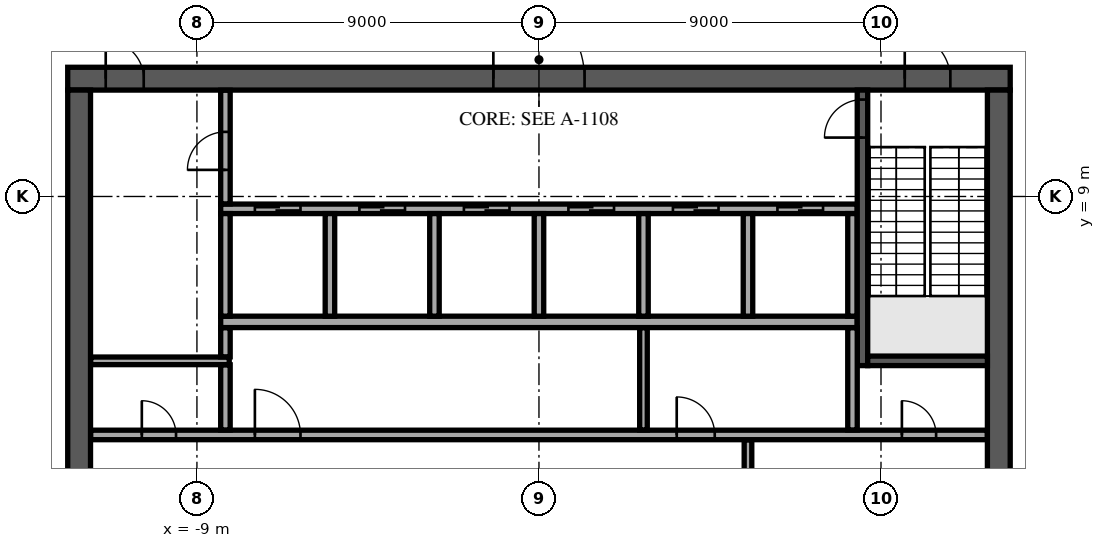
"""IFC4 building model, lengths in metres.
Left out: names, types, materials, properties, quantities, classifications, styles, units other than length and angle.
Written with IfcOpenShell. Run it as: python <this file> out.ifc"""

import sys

from ifc_helpers import new_model, si_unit, direction, frame, frame_2d, origin, place, context, subcontext, project, spatial, rectangle, extrude, element, fill, save


model = new_model("IFC4")
c1 = context("Model", 3, precision=1e-05, world=origin(), true_north=direction((0.0, 1.0)))
c2 = subcontext(c1, "Body", "Model", "MODEL_VIEW")
j1 = project(units=[si_unit("LENGTHUNIT", "METRE"), si_unit("PLANEANGLEUNIT", "RADIAN")], contexts=[c1])
p1 = place(None, origin())
s1 = spatial("IfcSite", under=j1, at=p1, CompositionType="ELEMENT")
p2 = place(p1, origin())
s2 = spatial("IfcBuilding", under=s1, at=p2, CompositionType="ELEMENT")
p3 = place(p2, frame((0.0, 0.0, 344.5)))
s3 = spatial("IfcBuildingStorey", under=s2, at=p3, CompositionType="ELEMENT", Elevation=344.5)
p4 = place(p3, frame((-12.4, 12.1, 0.0), z_axis=(0.0, 0.0, 1.0), x_axis=(1.0, 0.0, 0.0)))
e1 = element("IfcWall", 1, at=p4, inside=s3, PredefinedType="SHEAR", context=c2, shape_type="SweptSolid", body=[
    extrude(rectangle(XDim=24.8, YDim=0.6, at=frame_2d((12.4, 0.0))), origin(), (0.0, 0.0, 1.0), 5.3),
])
p5 = place(p4, frame((11.2, 0.0, 0.0)))
e2 = element("IfcOpeningElement", 2, at=p5, cuts=e1, PredefinedType="OPENING", context=c2, shape_type="SweptSolid", body=[
    extrude(rectangle(XDim=2.4, YDim=2.4, at=frame_2d((1.2, 1.2))), frame((0.0, 0.31, 0.0), z_axis=(0.0, -1.0, 0.0), x_axis=(1.0, 0.0, 0.0)), (0.0, 0.0, 1.0), 0.62),
])
p6 = place(p4, frame((22.025, 0.0, 0.0)))
e3 = element("IfcOpeningElement", 3, at=p6, cuts=e1, PredefinedType="OPENING", context=c2, shape_type="SweptSolid", body=[
    extrude(rectangle(XDim=1.2, YDim=2.1, at=frame_2d((0.6, 1.05))), frame((0.0, 0.31, 0.0), z_axis=(0.0, -1.0, 0.0), x_axis=(1.0, 0.0, 0.0)), (0.0, 0.0, 1.0), 0.62),
])
p7 = place(p4, frame((1.0, 0.0, 0.0)))
e4 = element("IfcOpeningElement", 4, at=p7, cuts=e1, PredefinedType="OPENING", context=c2, shape_type="SweptSolid", body=[
    extrude(rectangle(XDim=1.0, YDim=2.1, at=frame_2d((0.5, 1.05))), frame((0.0, 0.31, 0.0), z_axis=(0.0, -1.0, 0.0), x_axis=(1.0, 0.0, 0.0)), (0.0, 0.0, 1.0), 0.62),
])
p8 = place(p3, frame((12.1, -11.8, 0.0), z_axis=(0.0, 0.0, 1.0), x_axis=(0.0, 1.0, 0.0)))
e5 = element("IfcWall", 5, at=p8, inside=s3, PredefinedType="SHEAR", context=c2, shape_type="SweptSolid", body=[
    extrude(rectangle(XDim=23.6, YDim=0.6, at=frame_2d((11.8, 0.0))), origin(), (0.0, 0.0, 1.0), 5.3),
])
p9 = place(p8, frame((10.6, 0.0, 0.0)))
e6 = element("IfcOpeningElement", 6, at=p9, cuts=e5, PredefinedType="OPENING", context=c2, shape_type="SweptSolid", body=[
    extrude(rectangle(XDim=2.4, YDim=2.4, at=frame_2d((1.2, 1.2))), frame((0.0, 0.31, 0.0), z_axis=(0.0, -1.0, 0.0), x_axis=(1.0, 0.0, 0.0)), (0.0, 0.0, 1.0), 0.62),
])
p10 = place(p3, frame((-12.1, -11.8, 0.0), z_axis=(0.0, 0.0, 1.0), x_axis=(0.0, 1.0, 0.0)))
e7 = element("IfcWall", 7, at=p10, inside=s3, PredefinedType="SHEAR", context=c2, shape_type="SweptSolid", body=[
    extrude(rectangle(XDim=23.6, YDim=0.6, at=frame_2d((11.8, 0.0))), origin(), (0.0, 0.0, 1.0), 5.3),
])
p11 = place(p10, frame((10.6, 0.0, 0.0)))
e8 = element("IfcOpeningElement", 8, at=p11, cuts=e7, PredefinedType="OPENING", context=c2, shape_type="SweptSolid", body=[
    extrude(rectangle(XDim=2.4, YDim=2.4, at=frame_2d((1.2, 1.2))), frame((0.0, 0.31, 0.0), z_axis=(0.0, -1.0, 0.0), x_axis=(1.0, 0.0, 0.0)), (0.0, 0.0, 1.0), 0.62),
])
p12 = place(p3, frame((-8.375, 5.7, 0.0), z_axis=(0.0, 0.0, 1.0), x_axis=(1.0, 0.0, 0.0)))
e9 = element("IfcWall", 9, at=p12, inside=s3, PredefinedType="SOLIDWALL", context=c2, shape_type="SweptSolid", body=[
    extrude(rectangle(XDim=16.75, YDim=0.3, at=frame_2d((8.375, 0.0))), origin(), (0.0, 0.0, 1.0), 5.3),
])
p13 = place(p3, frame((-8.375, 8.675, 0.0), z_axis=(0.0, 0.0, 1.0), x_axis=(1.0, 0.0, 0.0)))
e10 = element("IfcWall", 10, at=p13, inside=s3, PredefinedType="SOLIDWALL", context=c2, shape_type="SweptSolid", body=[
    extrude(rectangle(XDim=16.75, YDim=0.25, at=frame_2d((8.375, 0.0))), origin(), (0.0, 0.0, 1.0), 5.3),
])
p14 = place(p13, frame((0.9, 0.0, 0.0)))
e11 = element("IfcOpeningElement", 11, at=p14, cuts=e10, PredefinedType="OPENING", context=c2, shape_type="SweptSolid", body=[
    extrude(rectangle(XDim=1.2, YDim=2.1, at=frame_2d((0.6, 1.05))), frame((0.0, 0.135, 0.0), z_axis=(0.0, -1.0, 0.0), x_axis=(1.0, 0.0, 0.0)), (0.0, 0.0, 1.0), 0.27),
])
p15 = place(p13, frame((3.65, 0.0, 0.0)))
e12 = element("IfcOpeningElement", 12, at=p15, cuts=e10, PredefinedType="OPENING", context=c2, shape_type="SweptSolid", body=[
    extrude(rectangle(XDim=1.2, YDim=2.1, at=frame_2d((0.6, 1.05))), frame((0.0, 0.135, 0.0), z_axis=(0.0, -1.0, 0.0), x_axis=(1.0, 0.0, 0.0)), (0.0, 0.0, 1.0), 0.27),
])
p16 = place(p13, frame((6.4, 0.0, 0.0)))
e13 = element("IfcOpeningElement", 13, at=p16, cuts=e10, PredefinedType="OPENING", context=c2, shape_type="SweptSolid", body=[
    extrude(rectangle(XDim=1.2, YDim=2.1, at=frame_2d((0.6, 1.05))), frame((0.0, 0.135, 0.0), z_axis=(0.0, -1.0, 0.0), x_axis=(1.0, 0.0, 0.0)), (0.0, 0.0, 1.0), 0.27),
])
p17 = place(p13, frame((9.15, 0.0, 0.0)))
e14 = element("IfcOpeningElement", 14, at=p17, cuts=e10, PredefinedType="OPENING", context=c2, shape_type="SweptSolid", body=[
    extrude(rectangle(XDim=1.2, YDim=2.1, at=frame_2d((0.6, 1.05))), frame((0.0, 0.135, 0.0), z_axis=(0.0, -1.0, 0.0), x_axis=(1.0, 0.0, 0.0)), (0.0, 0.0, 1.0), 0.27),
])
p18 = place(p13, frame((11.9, 0.0, 0.0)))
e15 = element("IfcOpeningElement", 15, at=p18, cuts=e10, PredefinedType="OPENING", context=c2, shape_type="SweptSolid", body=[
    extrude(rectangle(XDim=1.2, YDim=2.1, at=frame_2d((0.6, 1.05))), frame((0.0, 0.135, 0.0), z_axis=(0.0, -1.0, 0.0), x_axis=(1.0, 0.0, 0.0)), (0.0, 0.0, 1.0), 0.27),
])
p19 = place(p13, frame((14.65, 0.0, 0.0)))
e16 = element("IfcOpeningElement", 16, at=p19, cuts=e10, PredefinedType="OPENING", context=c2, shape_type="SweptSolid", body=[
    extrude(rectangle(XDim=1.2, YDim=2.1, at=frame_2d((0.6, 1.05))), frame((0.0, 0.135, 0.0), z_axis=(0.0, -1.0, 0.0), x_axis=(1.0, 0.0, 0.0)), (0.0, 0.0, 1.0), 0.27),
])
for number, where, z_axis, x_axis in (
    (17, (-8.25, 5.85, 0.0), (0.0, 0.0, 1.0), (0.0, 1.0, 0.0)),
    (18, (-5.5, 5.85, 0.0), (0.0, 0.0, 1.0), (0.0, 1.0, 0.0)),
    (19, (-2.75, 5.85, 0.0), (0.0, 0.0, 1.0), (0.0, 1.0, 0.0)),
    (20, (0.0, 5.85, 0.0), (0.0, 0.0, 1.0), (0.0, 1.0, 0.0)),
    (21, (2.75, 5.85, 0.0), (0.0, 0.0, 1.0), (0.0, 1.0, 0.0)),
    (22, (5.5, 5.85, 0.0), (0.0, 0.0, 1.0), (0.0, 1.0, 0.0)),
    (23, (8.25, 5.85, 0.0), (0.0, 0.0, 1.0), (0.0, 1.0, 0.0)),
):
    element("IfcWall", number, at=place(p3, frame(where, z_axis=z_axis, x_axis=x_axis)), inside=s3, PredefinedType="SOLIDWALL", context=c2, shape_type="SweptSolid", body=[
        extrude(rectangle(XDim=2.7, YDim=0.25, at=frame_2d((1.35, 0.0))), origin(), (0.0, 0.0, 1.0), 5.3),
    ])
p20 = place(p3, frame((8.512, 4.55, 0.0), z_axis=(0.0, 0.0, 1.0), x_axis=(0.0, 1.0, 0.0)))
e24 = element("IfcWall", 24, at=p20, inside=s3, PredefinedType="SOLIDWALL", context=c2, shape_type="SweptSolid", body=[
    extrude(rectangle(XDim=7.25, YDim=0.275, at=frame_2d((3.625, 0.0))), origin(), (0.0, 0.0, 1.0), 5.3),
])
p21 = place(p20, frame((6.0, 0.0, 0.0)))
e25 = element("IfcOpeningElement", 25, at=p21, cuts=e24, PredefinedType="OPENING", context=c2, shape_type="SweptSolid", body=[
    extrude(rectangle(XDim=1.0, YDim=2.1, at=frame_2d((0.5, 1.05))), frame((0.0, 0.147, 0.0), z_axis=(0.0, -1.0, 0.0), x_axis=(1.0, 0.0, 0.0)), (0.0, 0.0, 1.0), 0.295),
])
p22 = place(p3, frame((8.65, 4.675, 0.0), z_axis=(0.0, 0.0, 1.0), x_axis=(1.0, 0.0, 0.0)))
e26 = element("IfcWall", 26, at=p22, inside=s3, PredefinedType="SOLIDWALL", context=c2, shape_type="SweptSolid", body=[
    extrude(rectangle(XDim=3.15, YDim=0.25, at=frame_2d((1.575, 0.0))), origin(), (0.0, 0.0, 1.0), 5.3),
])
p23 = place(p3, frame((5.5, -2.595, 0.0), z_axis=(0.0, 0.0, 1.0), x_axis=(0.0, 1.0, 0.0)))
e27 = element("IfcWall", 27, at=p23, inside=s3, PredefinedType="PARTITIONING", context=c2, shape_type="SweptSolid", body=[
    extrude(rectangle(XDim=5.19, YDim=0.2, at=frame_2d((2.595, 0.0))), origin(), (0.0, 0.0, 1.0), 5.3),
])
p24 = place(p23, frame((1.395, 0.0, 0.0)))
e28 = element("IfcOpeningElement", 28, at=p24, cuts=e27, PredefinedType="OPENING", context=c2, shape_type="SweptSolid", body=[
    extrude(rectangle(XDim=2.4, YDim=2.4, at=frame_2d((1.2, 1.2))), frame((0.0, 0.11, 0.0), z_axis=(0.0, -1.0, 0.0), x_axis=(1.0, 0.0, 0.0)), (0.0, 0.0, 1.0), 0.22),
])
p25 = place(p3, frame((-11.795, 2.725, 0.0), z_axis=(0.0, 0.0, 1.0), x_axis=(1.0, 0.0, 0.0)))
e29 = element("IfcWall", 29, at=p25, inside=s3, PredefinedType="PARTITIONING", context=c2, shape_type="SweptSolid", body=[
    extrude(rectangle(XDim=23.59, YDim=0.25, at=frame_2d((11.795, 0.0))), origin(), (0.0, 0.0, 1.0), 5.3),
])
p26 = place(p25, frame((21.345, 0.0, 0.0)))
e30 = element("IfcOpeningElement", 30, at=p26, cuts=e29, PredefinedType="OPENING", context=c2, shape_type="SweptSolid", body=[
    extrude(rectangle(XDim=0.9, YDim=2.1, at=frame_2d((0.45, 1.05))), frame((0.0, 0.135, 0.0), z_axis=(0.0, -1.0, 0.0), x_axis=(1.0, 0.0, 0.0)), (0.0, 0.0, 1.0), 0.27),
])
p27 = place(p25, frame((1.345, 0.0, 0.0)))
e31 = element("IfcOpeningElement", 31, at=p27, cuts=e29, PredefinedType="OPENING", context=c2, shape_type="SweptSolid", body=[
    extrude(rectangle(XDim=0.9, YDim=2.1, at=frame_2d((0.45, 1.05))), frame((0.0, 0.135, 0.0), z_axis=(0.0, -1.0, 0.0), x_axis=(1.0, 0.0, 0.0)), (0.0, 0.0, 1.0), 0.27),
])
p28 = place(p25, frame((4.32, 0.0, 0.0)))
e32 = element("IfcOpeningElement", 32, at=p28, cuts=e29, PredefinedType="OPENING", context=c2, shape_type="SweptSolid", body=[
    extrude(rectangle(XDim=1.2, YDim=2.1, at=frame_2d((0.6, 1.05))), frame((0.0, 0.135, 0.0), z_axis=(0.0, -1.0, 0.0), x_axis=(1.0, 0.0, 0.0)), (0.0, 0.0, 1.0), 0.27),
])
p29 = place(p25, frame((15.42, 0.0, 0.0)))
e33 = element("IfcOpeningElement", 33, at=p29, cuts=e29, PredefinedType="OPENING", context=c2, shape_type="SweptSolid", body=[
    extrude(rectangle(XDim=1.0, YDim=2.1, at=frame_2d((0.5, 1.05))), frame((0.0, 0.135, 0.0), z_axis=(0.0, -1.0, 0.0), x_axis=(1.0, 0.0, 0.0)), (0.0, 0.0, 1.0), 0.27),
])
p30 = place(p3, frame((-8.25, 2.855, 0.0), z_axis=(0.0, 0.0, 1.0), x_axis=(0.0, 1.0, 0.0)))
e34 = element("IfcWall", 34, at=p30, inside=s3, PredefinedType="PARTITIONING", context=c2, shape_type="SweptSolid", body=[
    extrude(rectangle(XDim=1.715, YDim=0.25, at=frame_2d((0.857, 0.0))), origin(), (0.0, 0.0, 1.0), 5.3),
])
p31 = place(p3, frame((2.75, 2.855, 0.0), z_axis=(0.0, 0.0, 1.0), x_axis=(0.0, 1.0, 0.0)))
e35 = element("IfcWall", 35, at=p31, inside=s3, PredefinedType="PARTITIONING", context=c2, shape_type="SweptSolid", body=[
    extrude(rectangle(XDim=2.69, YDim=0.2, at=frame_2d((1.345, 0.0))), origin(), (0.0, 0.0, 1.0), 5.3),
])
p32 = place(p3, frame((8.25, 2.855, 0.0), z_axis=(0.0, 0.0, 1.0), x_axis=(0.0, 1.0, 0.0)))
e36 = element("IfcWall", 36, at=p32, inside=s3, PredefinedType="PARTITIONING", context=c2, shape_type="SweptSolid", body=[
    extrude(rectangle(XDim=2.69, YDim=0.25, at=frame_2d((1.345, 0.0))), origin(), (0.0, 0.0, 1.0), 5.3),
])
p33 = place(p3, frame((-11.795, 4.675, 0.0), z_axis=(0.0, 0.0, 1.0), x_axis=(1.0, 0.0, 0.0)))
e37 = element("IfcWall", 37, at=p33, inside=s3, PredefinedType="PARTITIONING", context=c2, shape_type="SweptSolid", body=[
    extrude(rectangle(XDim=3.645, YDim=0.2, at=frame_2d((1.823, 0.0))), origin(), (0.0, 0.0, 1.0), 5.3),
])
p34 = place(p3, frame((-8.25, 4.78, 0.0), z_axis=(0.0, 0.0, 1.0), x_axis=(0.0, 1.0, 0.0)))
e38 = element("IfcWall", 38, at=p34, inside=s3, PredefinedType="PARTITIONING", context=c2, shape_type="SweptSolid", body=[
    extrude(rectangle(XDim=0.765, YDim=0.25, at=frame_2d((0.382, 0.0))), origin(), (0.0, 0.0, 1.0), 5.3),
])
p35 = place(p3, frame((-8.25, 8.805, 0.0), z_axis=(0.0, 0.0, 1.0), x_axis=(0.0, 1.0, 0.0)))
e39 = element("IfcWall", 39, at=p35, inside=s3, PredefinedType="PARTITIONING", context=c2, shape_type="SweptSolid", body=[
    extrude(rectangle(XDim=2.99, YDim=0.25, at=frame_2d((1.495, 0.0))), origin(), (0.0, 0.0, 1.0), 5.3),
])
p36 = place(p35, frame((0.895, 0.0, 0.0)))
e40 = element("IfcOpeningElement", 40, at=p36, cuts=e39, PredefinedType="OPENING", context=c2, shape_type="SweptSolid", body=[
    extrude(rectangle(XDim=1.0, YDim=2.1, at=frame_2d((0.5, 1.05))), frame((0.0, 0.135, 0.0), z_axis=(0.0, -1.0, 0.0), x_axis=(1.0, 0.0, 0.0)), (0.0, 0.0, 1.0), 0.27),
])
p37 = place(p5, origin())
e41 = element("IfcDoor", 41, at=p37, inside=s3, OperationType="SINGLE_SWING_LEFT", PredefinedType="DOOR", context=c2, shape_type="SweptSolid", body=[
    extrude(rectangle(XDim=2.4, YDim=2.4, at=frame_2d((1.2, 1.2))), frame((0.0, 0.025, 0.0), z_axis=(0.0, -1.0, 0.0), x_axis=(1.0, 0.0, 0.0)), (0.0, 0.0, 1.0), 0.05),
])
fill(e2, e41)
p38 = place(p6, origin())
e42 = element("IfcDoor", 42, at=p38, inside=s3, OperationType="SINGLE_SWING_LEFT", PredefinedType="DOOR", context=c2, shape_type="SweptSolid", body=[
    extrude(rectangle(XDim=1.2, YDim=2.1, at=frame_2d((0.6, 1.05))), frame((0.0, 0.025, 0.0), z_axis=(0.0, -1.0, 0.0), x_axis=(1.0, 0.0, 0.0)), (0.0, 0.0, 1.0), 0.05),
])
fill(e3, e42)
p39 = place(p7, origin())
e43 = element("IfcDoor", 43, at=p39, inside=s3, OperationType="SINGLE_SWING_LEFT", PredefinedType="DOOR", context=c2, shape_type="SweptSolid", body=[
    extrude(rectangle(XDim=1.0, YDim=2.1, at=frame_2d((0.5, 1.05))), frame((0.0, 0.025, 0.0), z_axis=(0.0, -1.0, 0.0), x_axis=(1.0, 0.0, 0.0)), (0.0, 0.0, 1.0), 0.05),
])
fill(e4, e43)
p40 = place(p14, origin())
e44 = element("IfcDoor", 44, at=p40, inside=s3, OperationType="DOUBLE_DOOR_SLIDING", PredefinedType="DOOR", context=c2, shape_type="SweptSolid", body=[
    extrude(rectangle(XDim=1.2, YDim=2.1, at=frame_2d((0.6, 1.05))), frame((0.0, 0.025, 0.0), z_axis=(0.0, -1.0, 0.0), x_axis=(1.0, 0.0, 0.0)), (0.0, 0.0, 1.0), 0.05),
])
fill(e11, e44)
p41 = place(p15, origin())
e45 = element("IfcDoor", 45, at=p41, inside=s3, OperationType="DOUBLE_DOOR_SLIDING", PredefinedType="DOOR", context=c2, shape_type="SweptSolid", body=[
    extrude(rectangle(XDim=1.2, YDim=2.1, at=frame_2d((0.6, 1.05))), frame((0.0, 0.025, 0.0), z_axis=(0.0, -1.0, 0.0), x_axis=(1.0, 0.0, 0.0)), (0.0, 0.0, 1.0), 0.05),
])
fill(e12, e45)
p42 = place(p16, origin())
e46 = element("IfcDoor", 46, at=p42, inside=s3, OperationType="DOUBLE_DOOR_SLIDING", PredefinedType="DOOR", context=c2, shape_type="SweptSolid", body=[
    extrude(rectangle(XDim=1.2, YDim=2.1, at=frame_2d((0.6, 1.05))), frame((0.0, 0.025, 0.0), z_axis=(0.0, -1.0, 0.0), x_axis=(1.0, 0.0, 0.0)), (0.0, 0.0, 1.0), 0.05),
])
fill(e13, e46)
p43 = place(p17, origin())
e47 = element("IfcDoor", 47, at=p43, inside=s3, OperationType="DOUBLE_DOOR_SLIDING", PredefinedType="DOOR", context=c2, shape_type="SweptSolid", body=[
    extrude(rectangle(XDim=1.2, YDim=2.1, at=frame_2d((0.6, 1.05))), frame((0.0, 0.025, 0.0), z_axis=(0.0, -1.0, 0.0), x_axis=(1.0, 0.0, 0.0)), (0.0, 0.0, 1.0), 0.05),
])
fill(e14, e47)
p44 = place(p18, origin())
e48 = element("IfcDoor", 48, at=p44, inside=s3, OperationType="DOUBLE_DOOR_SLIDING", PredefinedType="DOOR", context=c2, shape_type="SweptSolid", body=[
    extrude(rectangle(XDim=1.2, YDim=2.1, at=frame_2d((0.6, 1.05))), frame((0.0, 0.025, 0.0), z_axis=(0.0, -1.0, 0.0), x_axis=(1.0, 0.0, 0.0)), (0.0, 0.0, 1.0), 0.05),
])
fill(e15, e48)
p45 = place(p19, origin())
e49 = element("IfcDoor", 49, at=p45, inside=s3, OperationType="DOUBLE_DOOR_SLIDING", PredefinedType="DOOR", context=c2, shape_type="SweptSolid", body=[
    extrude(rectangle(XDim=1.2, YDim=2.1, at=frame_2d((0.6, 1.05))), frame((0.0, 0.025, 0.0), z_axis=(0.0, -1.0, 0.0), x_axis=(1.0, 0.0, 0.0)), (0.0, 0.0, 1.0), 0.05),
])
fill(e16, e49)
p46 = place(p21, origin())
e50 = element("IfcDoor", 50, at=p46, inside=s3, OperationType="SINGLE_SWING_LEFT", PredefinedType="DOOR", context=c2, shape_type="SweptSolid", body=[
    extrude(rectangle(XDim=1.0, YDim=2.1, at=frame_2d((0.5, 1.05))), frame((0.0, 0.025, 0.0), z_axis=(0.0, -1.0, 0.0), x_axis=(1.0, 0.0, 0.0)), (0.0, 0.0, 1.0), 0.05),
])
fill(e25, e50)
p47 = place(p26, origin())
e51 = element("IfcDoor", 51, at=p47, inside=s3, OperationType="SINGLE_SWING_LEFT", PredefinedType="DOOR", context=c2, shape_type="SweptSolid", body=[
    extrude(rectangle(XDim=0.9, YDim=2.1, at=frame_2d((0.45, 1.05))), frame((0.0, 0.025, 0.0), z_axis=(0.0, -1.0, 0.0), x_axis=(1.0, 0.0, 0.0)), (0.0, 0.0, 1.0), 0.05),
])
fill(e30, e51)
p48 = place(p27, origin())
e52 = element("IfcDoor", 52, at=p48, inside=s3, OperationType="SINGLE_SWING_LEFT", PredefinedType="DOOR", context=c2, shape_type="SweptSolid", body=[
    extrude(rectangle(XDim=0.9, YDim=2.1, at=frame_2d((0.45, 1.05))), frame((0.0, 0.025, 0.0), z_axis=(0.0, -1.0, 0.0), x_axis=(1.0, 0.0, 0.0)), (0.0, 0.0, 1.0), 0.05),
])
fill(e31, e52)
p49 = place(p36, origin())
e53 = element("IfcDoor", 53, at=p49, inside=s3, OperationType="SINGLE_SWING_LEFT", PredefinedType="DOOR", context=c2, shape_type="SweptSolid", body=[
    extrude(rectangle(XDim=1.0, YDim=2.1, at=frame_2d((0.5, 1.05))), frame((0.0, 0.025, 0.0), z_axis=(0.0, -1.0, 0.0), x_axis=(1.0, 0.0, 0.0)), (0.0, 0.0, 1.0), 0.05),
])
fill(e40, e53)
p50 = place(p28, origin())
e54 = element("IfcDoor", 54, at=p50, inside=s3, OperationType="SINGLE_SWING_LEFT", PredefinedType="DOOR", context=c2, shape_type="SweptSolid", body=[
    extrude(rectangle(XDim=1.2, YDim=2.1, at=frame_2d((0.6, 1.05))), frame((0.0, 0.025, 0.0), z_axis=(0.0, -1.0, 0.0), x_axis=(1.0, 0.0, 0.0)), (0.0, 0.0, 1.0), 0.05),
])
fill(e32, e54)
p51 = place(p29, origin())
e55 = element("IfcDoor", 55, at=p51, inside=s3, OperationType="SINGLE_SWING_LEFT", PredefinedType="DOOR", context=c2, shape_type="SweptSolid", body=[
    extrude(rectangle(XDim=1.0, YDim=2.1, at=frame_2d((0.5, 1.05))), frame((0.0, 0.025, 0.0), z_axis=(0.0, -1.0, 0.0), x_axis=(1.0, 0.0, 0.0)), (0.0, 0.0, 1.0), 0.05),
])
fill(e33, e55)
save(model, sys.argv[1])
